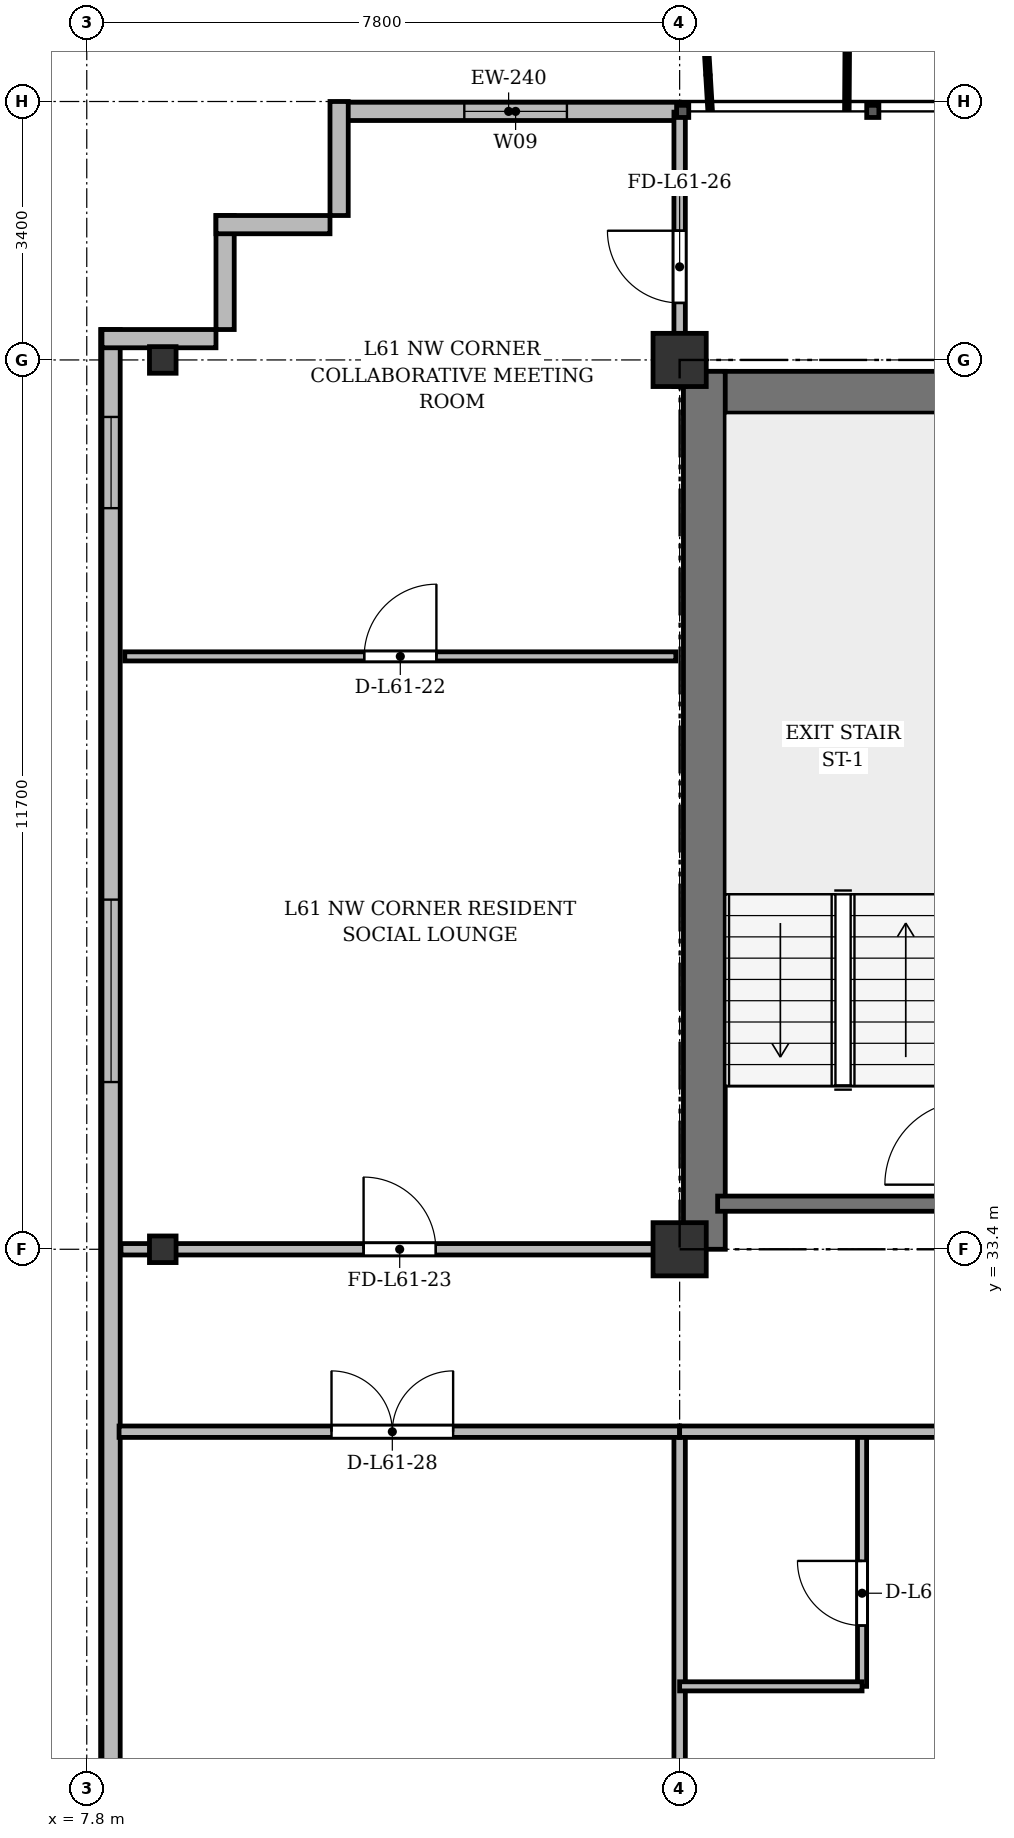
"""IFC4 building model, lengths in metres.
Left out: names, types, materials, properties, quantities, classifications, styles, units other than length and angle.
Written with IfcOpenShell. Run it as: python <this file> out.ifc"""

import sys

from ifc_helpers import new_model, si_unit, direction, frame, frame_2d, origin, origin_2d, place, context, subcontext, project, spatial, rectangle, i_section, extrude, source, transform, mapped, element, fill, save


model = new_model("IFC4")
c1 = context("Model", 3, precision=1e-05, world=origin(), true_north=direction((0.0, 1.0)))
c2 = subcontext(c1, "Body", "Model", "MODEL_VIEW")
j1 = project(units=[si_unit("LENGTHUNIT", "METRE"), si_unit("PLANEANGLEUNIT", "RADIAN")], contexts=[c1])
p1 = place(None, origin())
s1 = spatial("IfcSite", under=j1, at=p1, CompositionType="ELEMENT")
p2 = place(p1, origin())
s2 = spatial("IfcBuilding", under=s1, at=p2, CompositionType="ELEMENT")
p3 = place(p2, frame((0.0, 0.0, 233.7)))
s3 = spatial("IfcBuildingStorey", under=s2, at=p3, CompositionType="ELEMENT", Elevation=233.7)
m1 = source(origin(), c2, "Body", "SweptSolid", [
    extrude(i_section(OverallWidth=0.35, OverallDepth=0.35, WebThickness=0.018, FlangeThickness=0.028, at=origin_2d()), origin(), (0.0, 0.0, 1.0), 3.6),
])
for number, where, z_axis, x_axis in (
    (1, (8.8, 33.4, 0.0), (0.0, 0.0, 1.0), (1.0, 0.0, 0.0)),
    (2, (8.8, 45.1, 0.0), (0.0, 0.0, 1.0), (1.0, 0.0, 0.0)),
):
    element("IfcColumn", number, at=place(p3, frame(where, z_axis=z_axis, x_axis=x_axis)), inside=s3, PredefinedType="COLUMN", context=c2, shape_type="MappedRepresentation", body=[
        mapped(m1, transform((0.0, 0.0, 0.0), x_axis=(1.0, 0.0, 0.0), y_axis=(0.0, 1.0, 0.0), z_axis=(0.0, 0.0, 1.0), scale=1.0)),
    ])
m2 = source(origin(), c2, "Body", "SweptSolid", [
    extrude(rectangle(XDim=0.7, YDim=0.7, at=origin_2d()), origin(), (0.0, 0.0, 1.0), 3.6),
])
for number, where, z_axis, x_axis in (
    (3, (15.6, 33.4, 0.0), (0.0, 0.0, 1.0), (1.0, 0.0, 0.0)),
    (4, (15.6, 45.1, 0.0), (0.0, 0.0, 1.0), (1.0, 0.0, 0.0)),
):
    element("IfcColumn", number, at=place(p3, frame(where, z_axis=z_axis, x_axis=x_axis)), inside=s3, PredefinedType="COLUMN", context=c2, shape_type="MappedRepresentation", body=[
        mapped(m2, transform((0.0, 0.0, 0.0), x_axis=(1.0, 0.0, 0.0), y_axis=(0.0, 1.0, 0.0), z_axis=(0.0, 0.0, 1.0), scale=1.0)),
    ])
p4 = place(p3, frame((11.1, 48.37, 0.0), z_axis=(0.0, 0.0, 1.0), x_axis=(1.0, 0.0, 0.0)))
e5 = element("IfcWall", 5, at=p4, inside=s3, PredefinedType="SOLIDWALL", context=c2, shape_type="SweptSolid", body=[
    extrude(rectangle(XDim=4.5, YDim=0.24, at=frame_2d((2.25, 0.0))), origin(), (0.0, 0.0, 1.0), 3.36),
])
p5 = place(p4, frame((1.667, 0.0, 0.9)))
e6 = element("IfcOpeningElement", 6, at=p5, cuts=e5, PredefinedType="OPENING", context=c2, shape_type="SweptSolid", body=[
    extrude(rectangle(XDim=1.35, YDim=1.5, at=frame_2d((0.675, 0.75))), frame((0.0, 0.13, 0.0), z_axis=(0.0, -1.0, 0.0), x_axis=(1.0, 0.0, 0.0)), (0.0, 0.0, 1.0), 0.26),
])
p6 = place(p3, frame((8.12, 6.4, 0.0), z_axis=(0.0, 0.0, 1.0), x_axis=(0.0, 1.0, 0.0)))
e7 = element("IfcWall", 7, at=p6, inside=s3, PredefinedType="SOLIDWALL", context=c2, shape_type="SweptSolid", body=[
    extrude(rectangle(XDim=39.1, YDim=0.24, at=frame_2d((19.55, 0.0))), origin(), (0.0, 0.0, 1.0), 3.36),
])
p7 = place(p6, frame((1.45, 0.0, 0.92)))
e8 = element("IfcOpeningElement", 8, at=p7, cuts=e7, PredefinedType="OPENING", context=c2, shape_type="SweptSolid", body=[
    extrude(rectangle(XDim=1.2, YDim=1.65, at=frame_2d((0.6, 0.825))), frame((0.0, 0.13, 0.0), z_axis=(0.0, -1.0, 0.0), x_axis=(1.0, 0.0, 0.0)), (0.0, 0.0, 1.0), 0.26),
])
p8 = place(p6, frame((3.8, 0.0, 0.92)))
e9 = element("IfcOpeningElement", 9, at=p8, cuts=e7, PredefinedType="OPENING", context=c2, shape_type="SweptSolid", body=[
    extrude(rectangle(XDim=2.4, YDim=2.1, at=frame_2d((1.2, 1.05))), frame((0.0, 0.13, 0.0), z_axis=(0.0, -1.0, 0.0), x_axis=(1.0, 0.0, 0.0)), (0.0, 0.0, 1.0), 0.26),
])
p9 = place(p6, frame((8.0, 0.0, 0.92)))
e10 = element("IfcOpeningElement", 10, at=p9, cuts=e7, PredefinedType="OPENING", context=c2, shape_type="SweptSolid", body=[
    extrude(rectangle(XDim=2.4, YDim=2.1, at=frame_2d((1.2, 1.05))), frame((0.0, 0.13, 0.0), z_axis=(0.0, -1.0, 0.0), x_axis=(1.0, 0.0, 0.0)), (0.0, 0.0, 1.0), 0.26),
])
p10 = place(p6, frame((15.2, 0.0, 0.92)))
e11 = element("IfcOpeningElement", 11, at=p10, cuts=e7, PredefinedType="OPENING", context=c2, shape_type="SweptSolid", body=[
    extrude(rectangle(XDim=2.4, YDim=2.1, at=frame_2d((1.2, 1.05))), frame((0.0, 0.13, 0.0), z_axis=(0.0, -1.0, 0.0), x_axis=(1.0, 0.0, 0.0)), (0.0, 0.0, 1.0), 0.26),
])
p11 = place(p6, frame((29.2, 0.0, 0.92)))
e12 = element("IfcOpeningElement", 12, at=p11, cuts=e7, PredefinedType="OPENING", context=c2, shape_type="SweptSolid", body=[
    extrude(rectangle(XDim=2.4, YDim=2.1, at=frame_2d((1.2, 1.05))), frame((0.0, 0.13, 0.0), z_axis=(0.0, -1.0, 0.0), x_axis=(1.0, 0.0, 0.0)), (0.0, 0.0, 1.0), 0.26),
])
p12 = place(p6, frame((36.75, 0.0, 0.92)))
e13 = element("IfcOpeningElement", 13, at=p12, cuts=e7, PredefinedType="OPENING", context=c2, shape_type="SweptSolid", body=[
    extrude(rectangle(XDim=1.2, YDim=1.65, at=frame_2d((0.6, 0.825))), frame((0.0, 0.13, 0.0), z_axis=(0.0, -1.0, 0.0), x_axis=(1.0, 0.0, 0.0)), (0.0, 0.0, 1.0), 0.26),
])
for number, where, z_axis, x_axis in (
    (14, (8.0, 45.38, 0.0), (0.0, 0.0, 1.0), (1.0, 0.0, 0.0)),
    (15, (9.62, 45.5, 0.0), (0.0, 0.0, 1.0), (0.0, 1.0, 0.0)),
    (16, (9.5, 46.88, 0.0), (0.0, 0.0, 1.0), (1.0, 0.0, 0.0)),
    (17, (11.12, 47.0, 0.0), (0.0, 0.0, 1.0), (0.0, 1.0, 0.0)),
):
    element("IfcWall", number, at=place(p3, frame(where, z_axis=z_axis, x_axis=x_axis)), inside=s3, PredefinedType="SOLIDWALL", context=c2, shape_type="SweptSolid", body=[
        extrude(rectangle(XDim=1.5, YDim=0.24, at=frame_2d((0.75, 0.0))), origin(), (0.0, 0.0, 1.0), 3.36),
    ])
p13 = place(p3, frame((15.65, 44.675, 0.0), z_axis=(0.0, 0.0, 1.0), x_axis=(1.0, 0.0, 0.0)))
e18 = element("IfcWall", 18, at=p13, inside=s3, PredefinedType="SHEAR", context=c2, shape_type="SweptSolid", body=[
    extrude(rectangle(XDim=43.1, YDim=0.55, at=frame_2d((21.55, 0.0))), origin(), (0.0, 0.0, 1.0), 3.36),
])
p14 = place(p3, frame((15.925, 33.4, 0.0), z_axis=(0.0, 0.0, 1.0), x_axis=(0.0, 1.0, 0.0)))
e19 = element("IfcWall", 19, at=p14, inside=s3, PredefinedType="SHEAR", context=c2, shape_type="SweptSolid", body=[
    extrude(rectangle(XDim=11.55, YDim=0.55, at=frame_2d((5.775, 0.0))), origin(), (0.0, 0.0, 1.0), 3.36),
])
p15 = place(p3, frame((16.1, 34.0, 0.0), z_axis=(0.0, 0.0, 1.0), x_axis=(1.0, 0.0, 0.0)))
e20 = element("IfcWall", 20, at=p15, inside=s3, PredefinedType="SHEAR", context=c2, shape_type="SweptSolid", body=[
    extrude(rectangle(XDim=3.4, YDim=0.2, at=frame_2d((1.7, 0.0))), origin(), (0.0, 0.0, 1.0), 3.36),
])
p16 = place(p3, frame((8.3, 41.2, 0.0), z_axis=(0.0, 0.0, 1.0), x_axis=(1.0, 0.0, 0.0)))
e21 = element("IfcWall", 21, at=p16, inside=s3, PredefinedType="PARTITIONING", context=c2, shape_type="SweptSolid", body=[
    extrude(rectangle(XDim=7.25, YDim=0.12, at=frame_2d((3.625, 0.0))), origin(), (0.0, 0.0, 1.0), 2.86),
])
p17 = place(p16, frame((3.15, 0.0, 0.0)))
e22 = element("IfcOpeningElement", 22, at=p17, cuts=e21, PredefinedType="OPENING", context=c2, shape_type="SweptSolid", body=[
    extrude(rectangle(XDim=0.95, YDim=2.15, at=frame_2d((0.475, 1.075))), frame((0.0, 0.07, 0.0), z_axis=(0.0, -1.0, 0.0), x_axis=(1.0, 0.0, 0.0)), (0.0, 0.0, 1.0), 0.14),
])
p18 = place(p3, frame((8.25, 33.4, 0.0), z_axis=(0.0, 0.0, 1.0), x_axis=(1.0, 0.0, 0.0)))
e23 = element("IfcWall", 23, at=p18, inside=s3, PredefinedType="PARTITIONING", context=c2, shape_type="SweptSolid", body=[
    extrude(rectangle(XDim=7.35, YDim=0.15, at=frame_2d((3.675, 0.0))), origin(), (0.0, 0.0, 1.0), 2.91),
])
p19 = place(p18, frame((3.192, 0.0, 0.0)))
e24 = element("IfcOpeningElement", 24, at=p19, cuts=e23, PredefinedType="OPENING", context=c2, shape_type="SweptSolid", body=[
    extrude(rectangle(XDim=0.95, YDim=2.15, at=frame_2d((0.475, 1.075))), frame((0.0, 0.085, 0.0), z_axis=(0.0, -1.0, 0.0), x_axis=(1.0, 0.0, 0.0)), (0.0, 0.0, 1.0), 0.17),
])
p20 = place(p3, frame((15.6, 44.75, 0.0), z_axis=(0.0, 0.0, 1.0), x_axis=(0.0, 1.0, 0.0)))
e25 = element("IfcWall", 25, at=p20, inside=s3, PredefinedType="PARTITIONING", context=c2, shape_type="SweptSolid", body=[
    extrude(rectangle(XDim=3.61, YDim=0.15, at=frame_2d((1.805, 0.0))), origin(), (0.0, 0.0, 1.0), 2.86),
])
p21 = place(p20, frame((1.1, 0.0, 0.0)))
e26 = element("IfcOpeningElement", 26, at=p21, cuts=e25, PredefinedType="OPENING", context=c2, shape_type="SweptSolid", body=[
    extrude(rectangle(XDim=0.95, YDim=2.15, at=frame_2d((0.475, 1.075))), frame((0.0, 0.085, 0.0), z_axis=(0.0, -1.0, 0.0), x_axis=(1.0, 0.0, 0.0)), (0.0, 0.0, 1.0), 0.17),
])
p22 = place(p3, frame((15.6, 3.625, 0.0), z_axis=(0.0, 0.0, 1.0), x_axis=(0.0, 1.0, 0.0)))
e27 = element("IfcWall", 27, at=p22, inside=s3, PredefinedType="PARTITIONING", context=c2, shape_type="SweptSolid", body=[
    extrude(rectangle(XDim=27.375, YDim=0.15, at=frame_2d((13.688, 0.0))), origin(), (0.0, 0.0, 1.0), 2.86),
])
p23 = place(p3, frame((8.225, 31.0, 0.0), z_axis=(0.0, 0.0, 1.0), x_axis=(1.0, 0.0, 0.0)))
e28 = element("IfcWall", 28, at=p23, inside=s3, PredefinedType="PARTITIONING", context=c2, shape_type="SweptSolid", body=[
    extrude(rectangle(XDim=7.375, YDim=0.15, at=frame_2d((3.688, 0.0))), origin(), (0.0, 0.0, 1.0), 2.86),
])
p24 = place(p23, frame((2.795, 0.0, 0.0)))
e29 = element("IfcOpeningElement", 29, at=p24, cuts=e28, PredefinedType="OPENING", context=c2, shape_type="SweptSolid", body=[
    extrude(rectangle(XDim=1.6, YDim=2.2, at=frame_2d((0.8, 1.1))), frame((0.0, 0.085, 0.0), z_axis=(0.0, -1.0, 0.0), x_axis=(1.0, 0.0, 0.0)), (0.0, 0.0, 1.0), 0.17),
])
p25 = place(p3, frame((18.0, 27.65, 0.0), z_axis=(0.0, 0.0, 1.0), x_axis=(0.0, 1.0, 0.0)))
e30 = element("IfcWall", 30, at=p25, inside=s3, PredefinedType="PARTITIONING", context=c2, shape_type="SweptSolid", body=[
    extrude(rectangle(XDim=3.35, YDim=0.12, at=frame_2d((1.675, 0.0))), origin(), (0.0, 0.0, 1.0), 3.36),
])
p26 = place(p25, frame((0.8, 0.0, 0.0)))
e31 = element("IfcOpeningElement", 31, at=p26, cuts=e30, PredefinedType="OPENING", context=c2, shape_type="SweptSolid", body=[
    extrude(rectangle(XDim=0.85, YDim=2.1, at=frame_2d((0.425, 1.05))), frame((0.0, 0.07, 0.0), z_axis=(0.0, -1.0, 0.0), x_axis=(1.0, 0.0, 0.0)), (0.0, 0.0, 1.0), 0.14),
])
p27 = place(p3, frame((15.6, 27.65, 0.0), z_axis=(0.0, 0.0, 1.0), x_axis=(1.0, 0.0, 0.0)))
e32 = element("IfcWall", 32, at=p27, inside=s3, PredefinedType="PARTITIONING", context=c2, shape_type="SweptSolid", body=[
    extrude(rectangle(XDim=2.4, YDim=0.12, at=frame_2d((1.2, 0.0))), origin(), (0.0, 0.0, 1.0), 2.86),
])
p28 = place(p3, frame((15.6, 31.0, 0.0), z_axis=(0.0, 0.0, 1.0), x_axis=(1.0, 0.0, 0.0)))
e33 = element("IfcWall", 33, at=p28, inside=s3, PredefinedType="PARTITIONING", context=c2, shape_type="SweptSolid", body=[
    extrude(rectangle(XDim=7.8, YDim=0.15, at=frame_2d((3.9, 0.0))), origin(), (0.0, 0.0, 1.0), 2.86),
])
p29 = place(p28, frame((5.172, 0.0, 0.0)))
e34 = element("IfcOpeningElement", 34, at=p29, cuts=e33, PredefinedType="OPENING", context=c2, shape_type="SweptSolid", body=[
    extrude(rectangle(XDim=0.95, YDim=2.15, at=frame_2d((0.475, 1.075))), frame((0.0, 0.085, 0.0), z_axis=(0.0, -1.0, 0.0), x_axis=(1.0, 0.0, 0.0)), (0.0, 0.0, 1.0), 0.17),
])
m3 = source(origin(), c2, "Body", "SweptSolid", [
    extrude(rectangle(XDim=1.35, YDim=1.5, at=frame_2d((0.675, 0.75))), frame((0.0, 0.03, 0.0), z_axis=(0.0, -1.0, 0.0), x_axis=(1.0, 0.0, 0.0)), (0.0, 0.0, 1.0), 0.06),
])
p30 = place(p5, origin())
e35 = element("IfcWindow", 35, at=p30, inside=s3, PartitioningType="SINGLE_PANEL", PredefinedType="WINDOW", context=c2, shape_type="MappedRepresentation", body=[
    mapped(m3, transform((0.0, 0.0, 0.0), x_axis=(1.0, 0.0, 0.0), y_axis=(0.0, 1.0, 0.0), z_axis=(0.0, 0.0, 1.0), scale=1.0)),
])
fill(e6, e35)
m4 = source(origin(), c2, "Body", "SweptSolid", [
    extrude(rectangle(XDim=2.4, YDim=2.1, at=frame_2d((1.2, 1.05))), frame((0.0, 0.03, 0.0), z_axis=(0.0, -1.0, 0.0), x_axis=(1.0, 0.0, 0.0)), (0.0, 0.0, 1.0), 0.06),
])
p31 = place(p11, origin())
e36 = element("IfcWindow", 36, at=p31, inside=s3, PartitioningType="SINGLE_PANEL", PredefinedType="WINDOW", context=c2, shape_type="MappedRepresentation", body=[
    mapped(m4, transform((0.0, 0.0, 0.0), x_axis=(1.0, 0.0, 0.0), y_axis=(0.0, 1.0, 0.0), z_axis=(0.0, 0.0, 1.0), scale=1.0)),
])
fill(e12, e36)
m5 = source(origin(), c2, "Body", "SweptSolid", [
    extrude(rectangle(XDim=1.2, YDim=1.65, at=frame_2d((0.6, 0.825))), frame((0.0, 0.03, 0.0), z_axis=(0.0, -1.0, 0.0), x_axis=(1.0, 0.0, 0.0)), (0.0, 0.0, 1.0), 0.06),
])
p32 = place(p12, origin())
e37 = element("IfcWindow", 37, at=p32, inside=s3, PartitioningType="SINGLE_PANEL", PredefinedType="WINDOW", context=c2, shape_type="MappedRepresentation", body=[
    mapped(m5, transform((0.0, 0.0, 0.0), x_axis=(1.0, 0.0, 0.0), y_axis=(0.0, 1.0, 0.0), z_axis=(0.0, 0.0, 1.0), scale=1.0)),
])
fill(e13, e37)
m6 = source(origin(), c2, "Body", "SweptSolid", [
    extrude(rectangle(XDim=0.95, YDim=2.15, at=frame_2d((0.475, 1.075))), frame((0.0, 0.025, 0.0), z_axis=(0.0, -1.0, 0.0), x_axis=(1.0, 0.0, 0.0)), (0.0, 0.0, 1.0), 0.05),
])
p33 = place(p17, origin())
e38 = element("IfcDoor", 38, at=p33, inside=s3, OperationType="SINGLE_SWING_RIGHT", PredefinedType="DOOR", context=c2, shape_type="MappedRepresentation", body=[
    mapped(m6, transform((0.0, 0.0, 0.0), x_axis=(1.0, 0.0, 0.0), y_axis=(0.0, 1.0, 0.0), z_axis=(0.0, 0.0, 1.0), scale=1.0)),
])
fill(e22, e38)
p34 = place(p19, origin())
e39 = element("IfcDoor", 39, at=p34, inside=s3, OperationType="SINGLE_SWING_LEFT", PredefinedType="DOOR", context=c2, shape_type="MappedRepresentation", body=[
    mapped(m6, transform((0.0, 0.0, 0.0), x_axis=(1.0, 0.0, 0.0), y_axis=(0.0, 1.0, 0.0), z_axis=(0.0, 0.0, 1.0), scale=1.0)),
])
fill(e24, e39)
p35 = place(p21, origin())
e40 = element("IfcDoor", 40, at=p35, inside=s3, OperationType="SINGLE_SWING_RIGHT", PredefinedType="DOOR", context=c2, shape_type="MappedRepresentation", body=[
    mapped(m6, transform((0.0, 0.0, 0.0), x_axis=(1.0, 0.0, 0.0), y_axis=(0.0, 1.0, 0.0), z_axis=(0.0, 0.0, 1.0), scale=1.0)),
])
fill(e26, e40)
m7 = source(origin(), c2, "Body", "SweptSolid", [
    extrude(rectangle(XDim=1.6, YDim=2.2, at=frame_2d((0.8, 1.1))), frame((0.0, 0.025, 0.0), z_axis=(0.0, -1.0, 0.0), x_axis=(1.0, 0.0, 0.0)), (0.0, 0.0, 1.0), 0.05),
])
p36 = place(p24, origin())
e41 = element("IfcDoor", 41, at=p36, inside=s3, OperationType="DOUBLE_DOOR_SINGLE_SWING", PredefinedType="DOOR", context=c2, shape_type="MappedRepresentation", body=[
    mapped(m7, transform((0.0, 0.0, 0.0), x_axis=(1.0, 0.0, 0.0), y_axis=(0.0, 1.0, 0.0), z_axis=(0.0, 0.0, 1.0), scale=1.0)),
])
fill(e29, e41)
m8 = source(origin(), c2, "Body", "SweptSolid", [
    extrude(rectangle(XDim=0.85, YDim=2.1, at=frame_2d((0.425, 1.05))), frame((0.0, 0.025, 0.0), z_axis=(0.0, -1.0, 0.0), x_axis=(1.0, 0.0, 0.0)), (0.0, 0.0, 1.0), 0.05),
])
p37 = place(p26, origin())
e42 = element("IfcDoor", 42, at=p37, inside=s3, OperationType="SINGLE_SWING_RIGHT", PredefinedType="DOOR", context=c2, shape_type="MappedRepresentation", body=[
    mapped(m8, transform((0.0, 0.0, 0.0), x_axis=(1.0, 0.0, 0.0), y_axis=(0.0, 1.0, 0.0), z_axis=(0.0, 0.0, 1.0), scale=1.0)),
])
fill(e31, e42)
save(model, sys.argv[1])
